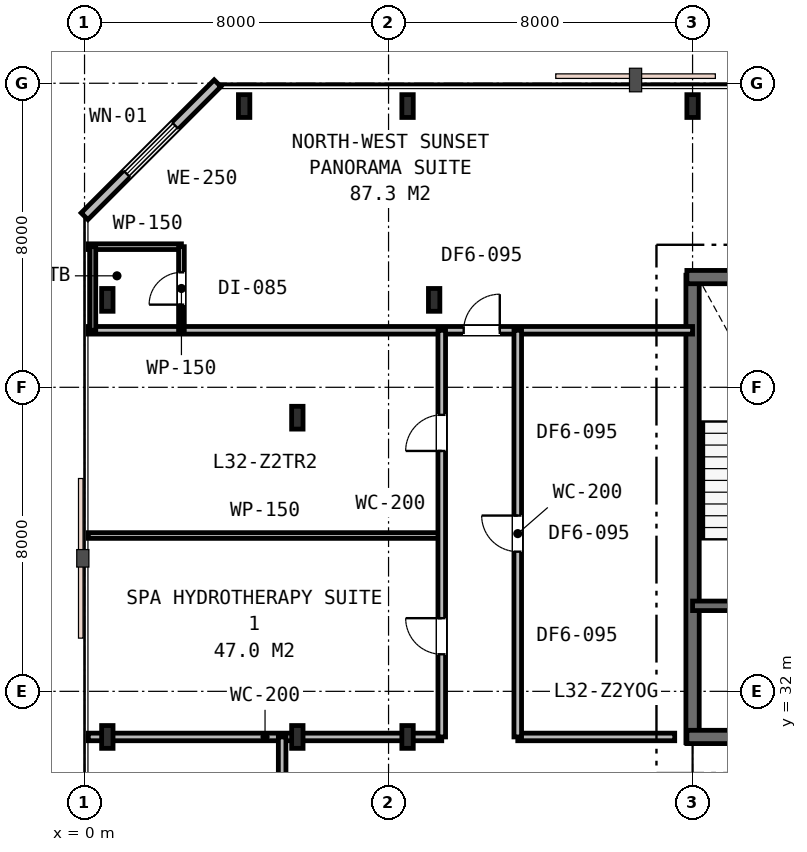
"""IFC4 building model, lengths in metres.
Left out: names, types, materials, properties, quantities, classifications, styles, units other than length and angle.
Written with IfcOpenShell. Run it as: python <this file> out.ifc"""

import sys

from ifc_helpers import new_model, si_unit, direction, frame, frame_2d, origin, origin_2d, place, context, subcontext, project, spatial, rectangle, i_section, extrude, element, fill, save


model = new_model("IFC4")
c1 = context("Model", 3, precision=1e-05, world=origin(), true_north=direction((0.0, 1.0)))
c2 = subcontext(c1, "Body", "Model", "MODEL_VIEW")
j1 = project(units=[si_unit("LENGTHUNIT", "METRE"), si_unit("PLANEANGLEUNIT", "RADIAN")], contexts=[c1])
p1 = place(None, origin())
s1 = spatial("IfcSite", under=j1, at=p1, CompositionType="ELEMENT")
p2 = place(p1, origin())
s2 = spatial("IfcBuilding", under=s1, at=p2, CompositionType="ELEMENT")
p3 = place(p2, frame((0.0, 0.0, 126.0)))
s3 = spatial("IfcBuildingStorey", under=s2, at=p3, CompositionType="ELEMENT", Elevation=126.0)
p4 = place(p3, frame((16.0, 30.65, 0.0), z_axis=(0.0, 0.0, 1.0), x_axis=(0.0, 1.0, 0.0)))
e1 = element("IfcWall", 1, at=p4, inside=s3, PredefinedType="SHEAR", context=c2, shape_type="SweptSolid", body=[
    extrude(rectangle(XDim=12.3, YDim=0.35, at=frame_2d((6.15, 0.0))), origin(), (0.0, 0.0, 1.0), 3.6),
])
p5 = place(p3, frame((15.85, 42.9, 0.0), z_axis=(0.0, 0.0, 1.0), x_axis=(1.0, 0.0, 0.0)))
e2 = element("IfcWall", 2, at=p5, inside=s3, PredefinedType="SHEAR", context=c2, shape_type="SweptSolid", body=[
    extrude(rectangle(XDim=24.3, YDim=0.35, at=frame_2d((12.15, 0.0))), origin(), (0.0, 0.0, 1.0), 3.6),
])
p6 = place(p3, frame((15.85, 30.8, 0.0), z_axis=(0.0, 0.0, 1.0), x_axis=(1.0, 0.0, 0.0)))
e3 = element("IfcWall", 3, at=p6, inside=s3, PredefinedType="SHEAR", context=c2, shape_type="SweptSolid", body=[
    extrude(rectangle(XDim=11.2, YDim=0.35, at=frame_2d((5.6, 0.0))), origin(), (0.0, 0.0, 1.0), 3.6),
])
p7 = place(p6, frame((2.45, 0.0, 0.0)))
e4 = element("IfcOpeningElement", 4, at=p7, cuts=e3, PredefinedType="OPENING", context=c2, shape_type="SweptSolid", body=[
    extrude(rectangle(XDim=1.1, YDim=2.15, at=frame_2d((0.55, 1.075))), frame((0.0, 0.185, 0.0), z_axis=(0.0, -1.0, 0.0), x_axis=(1.0, 0.0, 0.0)), (0.0, 0.0, 1.0), 0.37),
])
p8 = place(p3, frame((16.0, 34.25, 0.0), z_axis=(0.0, 0.0, 1.0), x_axis=(1.0, 0.0, 0.0)))
e5 = element("IfcWall", 5, at=p8, inside=s3, PredefinedType="SHEAR", context=c2, shape_type="SweptSolid", body=[
    extrude(rectangle(XDim=6.05, YDim=0.25, at=frame_2d((3.025, 0.0))), origin(), (0.0, 0.0, 1.0), 3.6),
])
p9 = place(p8, frame((1.25, 0.0, 0.0)))
e6 = element("IfcOpeningElement", 6, at=p9, cuts=e5, PredefinedType="OPENING", context=c2, shape_type="SweptSolid", body=[
    extrude(rectangle(XDim=1.0, YDim=2.15, at=frame_2d((0.5, 1.075))), frame((0.0, 0.135, 0.0), z_axis=(0.0, -1.0, 0.0), x_axis=(1.0, 0.0, 0.0)), (0.0, 0.0, 1.0), 0.27),
])
p10 = place(p8, frame((4.2, 0.0, 0.0)))
e7 = element("IfcOpeningElement", 7, at=p10, cuts=e5, PredefinedType="OPENING", context=c2, shape_type="SweptSolid", body=[
    extrude(rectangle(XDim=1.1, YDim=2.15, at=frame_2d((0.55, 1.075))), frame((0.0, 0.135, 0.0), z_axis=(0.0, -1.0, 0.0), x_axis=(1.0, 0.0, 0.0)), (0.0, 0.0, 1.0), 0.27),
])
for number, where, z_axis, x_axis in (
    (8, (5.6, 30.8, 0.0), (0.0, 0.0, 1.0), (1.0, 0.0, 0.0)),
    (9, (5.6, 39.2, 0.0), (0.0, 0.0, 1.0), (1.0, 0.0, 0.0)),
    (10, (8.5, 30.8, 0.0), (0.0, 0.0, 1.0), (1.0, 0.0, 0.0)),
    (11, (9.2, 42.3, 0.0), (0.0, 0.0, 1.0), (1.0, 0.0, 0.0)),
    (12, (0.6, 30.8, 0.0), (0.0, 0.0, 1.0), (1.0, 0.0, 0.0)),
    (13, (0.6, 42.3, 0.0), (0.0, 0.0, 1.0), (1.0, 0.0, 0.0)),
    (14, (4.2, 47.4, 0.0), (0.0, 0.0, 1.0), (1.0, 0.0, 0.0)),
    (15, (8.5, 47.4, 0.0), (0.0, 0.0, 1.0), (1.0, 0.0, 0.0)),
    (16, (16.0, 47.4, 0.0), (0.0, 0.0, 1.0), (1.0, 0.0, 0.0)),
):
    element("IfcColumn", number, at=place(p3, frame(where, z_axis=z_axis, x_axis=x_axis)), inside=s3, PredefinedType="COLUMN", context=c2, shape_type="SweptSolid", body=[
        extrude(i_section(OverallWidth=0.3, OverallDepth=0.6, WebThickness=0.015, FlangeThickness=0.03, FilletRadius=0.027, at=origin_2d()), origin(), (0.0, 0.0, 1.0), 3.6),
    ])
p11 = place(p3, frame((3.5, 48.0, 0.0), z_axis=(0.0, 0.0, 1.0), x_axis=(-0.707106781187, -0.707106781187, 0.0)))
e17 = element("IfcWall", 17, at=p11, inside=s3, PredefinedType="STANDARD", context=c2, shape_type="SweptSolid", body=[
    extrude(rectangle(XDim=4.95, YDim=0.25, at=frame_2d((2.475, 0.0))), origin(), (0.0, 0.0, 1.0), 3.33),
])
p12 = place(p11, frame((1.575, 0.0, 0.75)))
e18 = element("IfcOpeningElement", 18, at=p12, cuts=e17, PredefinedType="OPENING", context=c2, shape_type="SweptSolid", body=[
    extrude(rectangle(XDim=1.8, YDim=1.85, at=frame_2d((0.9, 0.925))), frame((0.0, 0.135, 0.0), z_axis=(0.0, -1.0, 0.0), x_axis=(1.0, 0.0, 0.0)), (0.0, 0.0, 1.0), 0.27),
])
p13 = place(p3, frame((0.1, 30.8, 0.0), z_axis=(0.0, 0.0, 1.0), x_axis=(1.0, 0.0, 0.0)))
e19 = element("IfcWall", 19, at=p13, inside=s3, PredefinedType="PARTITIONING", context=c2, shape_type="SweptSolid", body=[
    extrude(rectangle(XDim=9.3, YDim=0.2, at=frame_2d((4.65, 0.0))), origin(), (0.0, 0.0, 1.0), 2.87),
])
p14 = place(p3, frame((11.4, 30.8, 0.0), z_axis=(0.0, 0.0, 1.0), x_axis=(1.0, 0.0, 0.0)))
e20 = element("IfcWall", 20, at=p14, inside=s3, PredefinedType="PARTITIONING", context=c2, shape_type="SweptSolid", body=[
    extrude(rectangle(XDim=4.13, YDim=0.2, at=frame_2d((2.065, 0.0))), origin(), (0.0, 0.0, 1.0), 2.87),
])
p15 = place(p3, frame((5.2, 10.6, 0.0), z_axis=(0.0, 0.0, 1.0), x_axis=(0.0, 1.0, 0.0)))
e21 = element("IfcWall", 21, at=p15, inside=s3, PredefinedType="PARTITIONING", context=c2, shape_type="SweptSolid", body=[
    extrude(rectangle(XDim=20.2, YDim=0.2, at=frame_2d((10.1, 0.0))), origin(), (0.0, 0.0, 1.0), 2.87),
])
p16 = place(p15, frame((8.425, 0.0, 0.0)))
e22 = element("IfcOpeningElement", 22, at=p16, cuts=e21, PredefinedType="OPENING", context=c2, shape_type="SweptSolid", body=[
    extrude(rectangle(XDim=0.95, YDim=2.15, at=frame_2d((0.475, 1.075))), frame((0.0, 0.11, 0.0), z_axis=(0.0, -1.0, 0.0), x_axis=(1.0, 0.0, 0.0)), (0.0, 0.0, 1.0), 0.22),
])
p17 = place(p15, frame((14.68, 0.0, 0.0)))
e23 = element("IfcOpeningElement", 23, at=p17, cuts=e21, PredefinedType="OPENING", context=c2, shape_type="SweptSolid", body=[
    extrude(rectangle(XDim=0.95, YDim=2.15, at=frame_2d((0.475, 1.075))), frame((0.0, 0.11, 0.0), z_axis=(0.0, -1.0, 0.0), x_axis=(1.0, 0.0, 0.0)), (0.0, 0.0, 1.0), 0.22),
])
p18 = place(p15, frame((3.225, 0.0, 0.0)))
e24 = element("IfcOpeningElement", 24, at=p18, cuts=e21, PredefinedType="OPENING", context=c2, shape_type="SweptSolid", body=[
    extrude(rectangle(XDim=0.95, YDim=2.15, at=frame_2d((0.475, 1.075))), frame((0.0, 0.11, 0.0), z_axis=(0.0, -1.0, 0.0), x_axis=(1.0, 0.0, 0.0)), (0.0, 0.0, 1.0), 0.22),
])
p19 = place(p3, frame((0.1, 41.5, 0.0), z_axis=(0.0, 0.0, 1.0), x_axis=(1.0, 0.0, 0.0)))
e25 = element("IfcWall", 25, at=p19, inside=s3, PredefinedType="PARTITIONING", context=c2, shape_type="SweptSolid", body=[
    extrude(rectangle(XDim=15.9, YDim=0.2, at=frame_2d((7.95, 0.0))), origin(), (0.0, 0.0, 1.0), 2.87),
])
p20 = place(p19, frame((9.877, 0.0, 0.0)))
e26 = element("IfcOpeningElement", 26, at=p20, cuts=e25, PredefinedType="OPENING", context=c2, shape_type="SweptSolid", body=[
    extrude(rectangle(XDim=0.95, YDim=2.15, at=frame_2d((0.475, 1.075))), frame((0.0, 0.11, 0.0), z_axis=(0.0, -1.0, 0.0), x_axis=(1.0, 0.0, 0.0)), (0.0, 0.0, 1.0), 0.22),
])
p21 = place(p3, frame((0.1, 43.7, 0.0), z_axis=(0.0, 0.0, 1.0), x_axis=(1.0, 0.0, 0.0)))
e27 = element("IfcWall", 27, at=p21, inside=s3, PredefinedType="PARTITIONING", context=c2, shape_type="SweptSolid", body=[
    extrude(rectangle(XDim=2.45, YDim=0.15, at=frame_2d((1.225, 0.0))), origin(), (0.0, 0.0, 1.0), 3.33),
])
p22 = place(p3, frame((2.55, 41.5, 0.0), z_axis=(0.0, 0.0, 1.0), x_axis=(0.0, 1.0, 0.0)))
e28 = element("IfcWall", 28, at=p22, inside=s3, PredefinedType="PARTITIONING", context=c2, shape_type="SweptSolid", body=[
    extrude(rectangle(XDim=2.2, YDim=0.15, at=frame_2d((1.1, 0.0))), origin(), (0.0, 0.0, 1.0), 2.87),
])
p23 = place(p22, frame((0.675, 0.0, 0.0)))
e29 = element("IfcOpeningElement", 29, at=p23, cuts=e28, PredefinedType="OPENING", context=c2, shape_type="SweptSolid", body=[
    extrude(rectangle(XDim=0.85, YDim=2.15, at=frame_2d((0.425, 1.075))), frame((0.0, 0.085, 0.0), z_axis=(0.0, -1.0, 0.0), x_axis=(1.0, 0.0, 0.0)), (0.0, 0.0, 1.0), 0.17),
])
p24 = place(p3, frame((0.22, 41.5, 0.0), z_axis=(0.0, 0.0, 1.0), x_axis=(0.0, 1.0, 0.0)))
e30 = element("IfcWall", 30, at=p24, inside=s3, PredefinedType="PARTITIONING", context=c2, shape_type="SweptSolid", body=[
    extrude(rectangle(XDim=2.2, YDim=0.15, at=frame_2d((1.1, 0.0))), origin(), (0.0, 0.0, 1.0), 2.87),
])
p25 = place(p3, frame((0.1, 36.1, 0.0), z_axis=(0.0, 0.0, 1.0), x_axis=(1.0, 0.0, 0.0)))
e31 = element("IfcWall", 31, at=p25, inside=s3, PredefinedType="PARTITIONING", context=c2, shape_type="SweptSolid", body=[
    extrude(rectangle(XDim=9.3, YDim=0.15, at=frame_2d((4.65, 0.0))), origin(), (0.0, 0.0, 1.0), 2.87),
])
p26 = place(p3, frame((9.4, 30.8, 0.0), z_axis=(0.0, 0.0, 1.0), x_axis=(0.0, 1.0, 0.0)))
e32 = element("IfcWall", 32, at=p26, inside=s3, PredefinedType="PARTITIONING", context=c2, shape_type="SweptSolid", body=[
    extrude(rectangle(XDim=10.7, YDim=0.2, at=frame_2d((5.35, 0.0))), origin(), (0.0, 0.0, 1.0), 2.87),
])
p27 = place(p26, frame((2.175, 0.0, 0.0)))
e33 = element("IfcOpeningElement", 33, at=p27, cuts=e32, PredefinedType="OPENING", context=c2, shape_type="SweptSolid", body=[
    extrude(rectangle(XDim=0.95, YDim=2.15, at=frame_2d((0.475, 1.075))), frame((0.0, 0.11, 0.0), z_axis=(0.0, -1.0, 0.0), x_axis=(1.0, 0.0, 0.0)), (0.0, 0.0, 1.0), 0.22),
])
p28 = place(p26, frame((7.525, 0.0, 0.0)))
e34 = element("IfcOpeningElement", 34, at=p28, cuts=e32, PredefinedType="OPENING", context=c2, shape_type="SweptSolid", body=[
    extrude(rectangle(XDim=0.95, YDim=2.15, at=frame_2d((0.475, 1.075))), frame((0.0, 0.11, 0.0), z_axis=(0.0, -1.0, 0.0), x_axis=(1.0, 0.0, 0.0)), (0.0, 0.0, 1.0), 0.22),
])
p29 = place(p3, frame((11.4, 30.8, 0.0), z_axis=(0.0, 0.0, 1.0), x_axis=(0.0, 1.0, 0.0)))
e35 = element("IfcWall", 35, at=p29, inside=s3, PredefinedType="PARTITIONING", context=c2, shape_type="SweptSolid", body=[
    extrude(rectangle(XDim=10.7, YDim=0.2, at=frame_2d((5.35, 0.0))), origin(), (0.0, 0.0, 1.0), 2.87),
])
p30 = place(p29, frame((4.875, 0.0, 0.0)))
e36 = element("IfcOpeningElement", 36, at=p30, cuts=e35, PredefinedType="OPENING", context=c2, shape_type="SweptSolid", body=[
    extrude(rectangle(XDim=0.95, YDim=2.15, at=frame_2d((0.475, 1.075))), frame((0.0, 0.11, 0.0), z_axis=(0.0, -1.0, 0.0), x_axis=(1.0, 0.0, 0.0)), (0.0, 0.0, 1.0), 0.22),
])
p31 = place(p12, origin())
e37 = element("IfcWindow", 37, at=p31, inside=s3, PartitioningType="SINGLE_PANEL", PredefinedType="WINDOW", context=c2, shape_type="SweptSolid", body=[
    extrude(rectangle(XDim=1.8, YDim=1.85, at=frame_2d((0.9, 0.925))), frame((0.0, 0.03, 0.0), z_axis=(0.0, -1.0, 0.0), x_axis=(1.0, 0.0, 0.0)), (0.0, 0.0, 1.0), 0.06),
])
fill(e18, e37)
p32 = place(p20, origin())
e38 = element("IfcDoor", 38, at=p32, inside=s3, OperationType="SINGLE_SWING_RIGHT", PredefinedType="DOOR", context=c2, shape_type="SweptSolid", body=[
    extrude(rectangle(XDim=0.95, YDim=2.15, at=frame_2d((0.475, 1.075))), frame((0.0, 0.025, 0.0), z_axis=(0.0, -1.0, 0.0), x_axis=(1.0, 0.0, 0.0)), (0.0, 0.0, 1.0), 0.05),
])
fill(e26, e38)
p33 = place(p23, origin())
e39 = element("IfcDoor", 39, at=p33, inside=s3, OperationType="SINGLE_SWING_LEFT", PredefinedType="DOOR", context=c2, shape_type="SweptSolid", body=[
    extrude(rectangle(XDim=0.85, YDim=2.15, at=frame_2d((0.425, 1.075))), frame((0.0, 0.025, 0.0), z_axis=(0.0, -1.0, 0.0), x_axis=(1.0, 0.0, 0.0)), (0.0, 0.0, 1.0), 0.05),
])
fill(e29, e39)
p34 = place(p27, origin())
e40 = element("IfcDoor", 40, at=p34, inside=s3, OperationType="SINGLE_SWING_RIGHT", PredefinedType="DOOR", context=c2, shape_type="SweptSolid", body=[
    extrude(rectangle(XDim=0.95, YDim=2.15, at=frame_2d((0.475, 1.075))), frame((0.0, 0.025, 0.0), z_axis=(0.0, -1.0, 0.0), x_axis=(1.0, 0.0, 0.0)), (0.0, 0.0, 1.0), 0.05),
])
fill(e33, e40)
p35 = place(p28, origin())
e41 = element("IfcDoor", 41, at=p35, inside=s3, OperationType="SINGLE_SWING_LEFT", PredefinedType="DOOR", context=c2, shape_type="SweptSolid", body=[
    extrude(rectangle(XDim=0.95, YDim=2.15, at=frame_2d((0.475, 1.075))), frame((0.0, 0.025, 0.0), z_axis=(0.0, -1.0, 0.0), x_axis=(1.0, 0.0, 0.0)), (0.0, 0.0, 1.0), 0.05),
])
fill(e34, e41)
p36 = place(p30, origin())
e42 = element("IfcDoor", 42, at=p36, inside=s3, OperationType="SINGLE_SWING_RIGHT", PredefinedType="DOOR", context=c2, shape_type="SweptSolid", body=[
    extrude(rectangle(XDim=0.95, YDim=2.15, at=frame_2d((0.475, 1.075))), frame((0.0, 0.025, 0.0), z_axis=(0.0, -1.0, 0.0), x_axis=(1.0, 0.0, 0.0)), (0.0, 0.0, 1.0), 0.05),
])
fill(e36, e42)
save(model, sys.argv[1])
